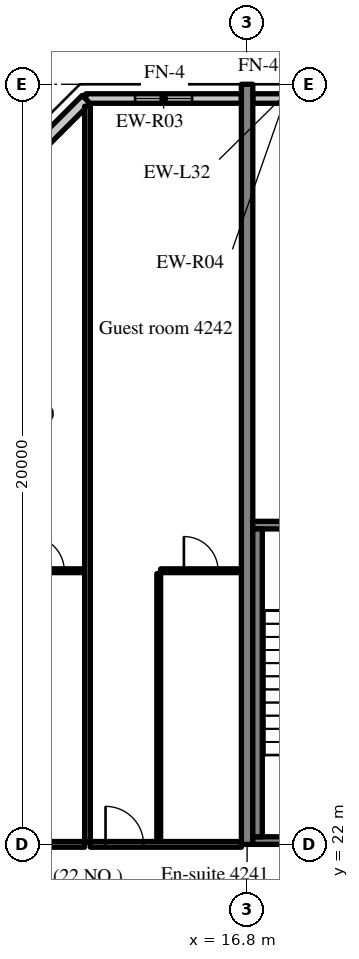
"""IFC4 building model, lengths in metres.
Left out: names, types, materials, properties, quantities, classifications, styles, units other than length and angle.
Written with IfcOpenShell. Run it as: python <this file> out.ifc"""

import sys

from ifc_helpers import new_model, si_unit, direction, frame, frame_2d, origin, place, context, subcontext, project, spatial, rectangle, extrude, source, transform, mapped, element, fill, save


model = new_model("IFC4")
c1 = context("Model", 3, precision=1e-05, world=origin(), true_north=direction((0.0, 1.0)))
c2 = subcontext(c1, "Body", "Model", "MODEL_VIEW")
j1 = project(units=[si_unit("LENGTHUNIT", "METRE"), si_unit("PLANEANGLEUNIT", "RADIAN")], contexts=[c1])
p1 = place(None, origin())
s1 = spatial("IfcSite", under=j1, at=p1, CompositionType="ELEMENT")
p2 = place(p1, origin())
s2 = spatial("IfcBuilding", under=s1, at=p2, CompositionType="ELEMENT")
p3 = place(p2, frame((0.0, 0.0, 174.4)))
s3 = spatial("IfcBuildingStorey", under=s2, at=p3, CompositionType="ELEMENT", Elevation=174.4)
m1 = source(origin(), c2, "Body", "SweptSolid", [
    extrude(rectangle(XDim=20.0, YDim=0.3, at=frame_2d((10.0, 0.0))), origin(), (0.0, 0.0, 1.0), 3.52),
])
p4 = place(p3, frame((16.8, 22.0, 0.0), z_axis=(0.0, 0.0, 1.0), x_axis=(0.0, 1.0, 0.0)))
e1 = element("IfcWall", 1, at=p4, inside=s3, PredefinedType="SHEAR", context=c2, shape_type="MappedRepresentation", body=[
    mapped(m1, transform((0.0, 0.0, 0.0), scale=1.0)),
])
m2 = source(origin(), c2, "Body", "SweptSolid", [
    extrude(rectangle(XDim=4.094, YDim=0.25, at=frame_2d((2.047, 0.0))), origin(), (0.0, 0.0, 1.0), 2.87),
])
p5 = place(p3, frame((16.65, 41.625, 0.0), z_axis=(0.0, 0.0, 1.0), x_axis=(-1.0, 0.0, 0.0)))
e2 = element("IfcWall", 2, at=p5, inside=s3, PredefinedType="SOLIDWALL", context=c2, shape_type="MappedRepresentation", body=[
    mapped(m2, transform((0.0, 0.0, 0.0), scale=1.0)),
])
m3 = source(origin(), c2, "Body", "SweptSolid", [
    extrude(rectangle(XDim=1.5, YDim=1.5, at=frame_2d((0.75, 0.75))), frame((0.0, 0.135, 0.0), z_axis=(0.0, -1.0, 0.0), x_axis=(1.0, 0.0, 0.0)), (0.0, 0.0, 1.0), 0.27),
])
p6 = place(p5, frame((1.297, 0.0, 0.9)))
e3 = element("IfcOpeningElement", 3, at=p6, cuts=e2, PredefinedType="OPENING", context=c2, shape_type="MappedRepresentation", body=[
    mapped(m3, transform((0.0, 0.0, 0.0), scale=1.0)),
])
m4 = source(origin(), c2, "Body", "SweptSolid", [
    extrude(rectangle(XDim=1.708, YDim=0.25, at=frame_2d((0.854, 0.0))), origin(), (0.0, 0.0, 1.0), 2.87),
])
p7 = place(p3, frame((18.658, 41.625, 0.0), z_axis=(0.0, 0.0, 1.0), x_axis=(-1.0, 0.0, 0.0)))
e4 = element("IfcWall", 4, at=p7, inside=s3, PredefinedType="SOLIDWALL", context=c2, shape_type="MappedRepresentation", body=[
    mapped(m4, transform((0.0, 0.0, 0.0), scale=1.0)),
])
m5 = source(origin(), c2, "Body", "SweptSolid", [
    extrude(rectangle(XDim=5.326, YDim=0.3, at=frame_2d((2.663, 0.0))), origin(), (0.0, 0.0, 1.0), 3.52),
])
p8 = place(p3, frame((12.566, 41.6, 0.0), z_axis=(0.0, 0.0, 1.0), x_axis=(-0.707083859269, -0.707129702361, 0.0)))
e5 = element("IfcWall", 5, at=p8, inside=s3, PredefinedType="SOLIDWALL", context=c2, shape_type="MappedRepresentation", body=[
    mapped(m5, transform((0.0, 0.0, 0.0), scale=1.0)),
])
m6 = source(origin(), c2, "Body", "SweptSolid", [
    extrude(rectangle(XDim=1.8, YDim=1.5, at=frame_2d((0.9, 0.75))), frame((0.0, 0.16, 0.0), z_axis=(0.0, -1.0, 0.0), x_axis=(1.0, 0.0, 0.0)), (0.0, 0.0, 1.0), 0.32),
])
p9 = place(p8, frame((1.689, 0.0, 0.9)))
e6 = element("IfcOpeningElement", 6, at=p9, cuts=e5, PredefinedType="OPENING", context=c2, shape_type="MappedRepresentation", body=[
    mapped(m6, transform((0.0, 0.0, 0.0), scale=1.0)),
])
m7 = source(origin(), c2, "Body", "SweptSolid", [
    extrude(rectangle(XDim=8.25, YDim=0.2, at=frame_2d((4.125, 0.0))), origin(), (0.0, 0.0, 1.0), 3.52),
])
p10 = place(p3, frame((16.95, 22.1, 0.0), z_axis=(0.0, 0.0, 1.0), x_axis=(1.0, 0.0, 0.0)))
e7 = element("IfcWall", 7, at=p10, inside=s3, PredefinedType="SOLIDWALL", context=c2, shape_type="MappedRepresentation", body=[
    mapped(m7, transform((0.0, 0.0, 0.0), scale=1.0)),
])
m8 = source(origin(), c2, "Body", "SweptSolid", [
    extrude(rectangle(XDim=1.2, YDim=2.1, at=frame_2d((0.6, 1.05))), frame((0.0, 0.11, 0.0), z_axis=(0.0, -1.0, 0.0), x_axis=(1.0, 0.0, 0.0)), (0.0, 0.0, 1.0), 0.22),
])
p11 = place(p10, frame((6.05, 0.0, 0.0)))
e8 = element("IfcOpeningElement", 8, at=p11, cuts=e7, PredefinedType="OPENING", context=c2, shape_type="MappedRepresentation", body=[
    mapped(m8, transform((0.0, 0.0, 0.0), scale=1.0)),
])
p12 = place(p3, frame((16.95, 30.4, 0.0), z_axis=(0.0, 0.0, 1.0), x_axis=(1.0, 0.0, 0.0)))
e9 = element("IfcWall", 9, at=p12, inside=s3, PredefinedType="SOLIDWALL", context=c2, shape_type="MappedRepresentation", body=[
    mapped(m7, transform((0.0, 0.0, 0.0), scale=1.0)),
])
m9 = source(origin(), c2, "Body", "SweptSolid", [
    extrude(rectangle(XDim=1.0, YDim=2.1, at=frame_2d((0.5, 1.05))), frame((0.0, 0.11, 0.0), z_axis=(0.0, -1.0, 0.0), x_axis=(1.0, 0.0, 0.0)), (0.0, 0.0, 1.0), 0.22),
])
p13 = place(p12, frame((6.15, 0.0, 0.0)))
e10 = element("IfcOpeningElement", 10, at=p13, cuts=e9, PredefinedType="OPENING", context=c2, shape_type="MappedRepresentation", body=[
    mapped(m9, transform((0.0, 0.0, 0.0), scale=1.0)),
])
m10 = source(origin(), c2, "Body", "SweptSolid", [
    extrude(rectangle(XDim=8.1, YDim=0.25, at=frame_2d((4.05, 0.0))), origin(), (0.0, 0.0, 1.0), 3.52),
])
p14 = place(p3, frame((17.075, 22.2, 0.0), z_axis=(0.0, 0.0, 1.0), x_axis=(0.0, 1.0, 0.0)))
e11 = element("IfcWall", 11, at=p14, inside=s3, PredefinedType="SOLIDWALL", context=c2, shape_type="MappedRepresentation", body=[
    mapped(m10, transform((0.0, 0.0, 0.0), scale=1.0)),
])
m11 = source(origin(), c2, "Body", "SweptSolid", [
    extrude(rectangle(XDim=1.975, YDim=0.1, at=frame_2d((0.987, 0.0))), origin(), (0.0, 0.0, 1.0), 3.52),
])
p15 = place(p3, frame((10.55, 29.2, 0.0), z_axis=(0.0, 0.0, 1.0), x_axis=(1.0, 0.0, 0.0)))
e12 = element("IfcWall", 12, at=p15, inside=s3, PredefinedType="PARTITIONING", context=c2, shape_type="MappedRepresentation", body=[
    mapped(m11, transform((0.0, 0.0, 0.0), scale=1.0)),
])
m12 = source(origin(), c2, "Body", "SweptSolid", [
    extrude(rectangle(XDim=0.9, YDim=2.1, at=frame_2d((0.45, 1.05))), frame((0.0, 0.06, 0.0), z_axis=(0.0, -1.0, 0.0), x_axis=(1.0, 0.0, 0.0)), (0.0, 0.0, 1.0), 0.12),
])
p16 = place(p15, frame((0.538, 0.0, 0.0)))
e13 = element("IfcOpeningElement", 13, at=p16, cuts=e12, PredefinedType="OPENING", context=c2, shape_type="MappedRepresentation", body=[
    mapped(m12, transform((0.0, 0.0, 0.0), scale=1.0)),
])
m13 = source(origin(), c2, "Body", "SweptSolid", [
    extrude(rectangle(XDim=3.825, YDim=0.15, at=frame_2d((1.913, 0.0))), origin(), (0.0, 0.0, 1.0), 2.82),
])
p17 = place(p3, frame((8.7, 22.0, 0.0), z_axis=(0.0, 0.0, 1.0), x_axis=(1.0, 0.0, 0.0)))
e14 = element("IfcWall", 14, at=p17, inside=s3, PredefinedType="PARTITIONING", context=c2, shape_type="MappedRepresentation", body=[
    mapped(m13, transform((0.0, 0.0, 0.0), scale=1.0)),
])
m14 = source(origin(), c2, "Body", "SweptSolid", [
    extrude(rectangle(XDim=1.0, YDim=2.1, at=frame_2d((0.5, 1.05))), frame((0.0, 0.085, 0.0), z_axis=(0.0, -1.0, 0.0), x_axis=(1.0, 0.0, 0.0)), (0.0, 0.0, 1.0), 0.17),
])
p18 = place(p17, frame((0.4, 0.0, 0.0)))
e15 = element("IfcOpeningElement", 15, at=p18, cuts=e14, PredefinedType="OPENING", context=c2, shape_type="MappedRepresentation", body=[
    mapped(m14, transform((0.0, 0.0, 0.0), scale=1.0)),
])
m15 = source(origin(), c2, "Body", "SweptSolid", [
    extrude(rectangle(XDim=7.05, YDim=0.1, at=frame_2d((3.525, 0.0))), origin(), (0.0, 0.0, 1.0), 3.52),
])
p19 = place(p3, frame((14.475, 22.075, 0.0), z_axis=(0.0, 0.0, 1.0), x_axis=(0.0, 1.0, 0.0)))
e16 = element("IfcWall", 16, at=p19, inside=s3, PredefinedType="PARTITIONING", context=c2, shape_type="MappedRepresentation", body=[
    mapped(m15, transform((0.0, 0.0, 0.0), scale=1.0)),
])
m16 = source(origin(), c2, "Body", "SweptSolid", [
    extrude(rectangle(XDim=2.125, YDim=0.1, at=frame_2d((1.062, 0.0))), origin(), (0.0, 0.0, 1.0), 3.52),
])
p20 = place(p3, frame((14.525, 29.2, 0.0), z_axis=(0.0, 0.0, 1.0), x_axis=(1.0, 0.0, 0.0)))
e17 = element("IfcWall", 17, at=p20, inside=s3, PredefinedType="PARTITIONING", context=c2, shape_type="MappedRepresentation", body=[
    mapped(m16, transform((0.0, 0.0, 0.0), scale=1.0)),
])
p21 = place(p20, frame((0.612, 0.0, 0.0)))
e18 = element("IfcOpeningElement", 18, at=p21, cuts=e17, PredefinedType="OPENING", context=c2, shape_type="MappedRepresentation", body=[
    mapped(m12, transform((0.0, 0.0, 0.0), scale=1.0)),
])
m17 = source(origin(), c2, "Body", "SweptSolid", [
    extrude(rectangle(XDim=3.975, YDim=0.15, at=frame_2d((1.987, 0.0))), origin(), (0.0, 0.0, 1.0), 2.82),
])
p22 = place(p3, frame((12.675, 22.0, 0.0), z_axis=(0.0, 0.0, 1.0), x_axis=(1.0, 0.0, 0.0)))
e19 = element("IfcWall", 19, at=p22, inside=s3, PredefinedType="PARTITIONING", context=c2, shape_type="MappedRepresentation", body=[
    mapped(m17, transform((0.0, 0.0, 0.0), scale=1.0)),
])
p23 = place(p22, frame((0.4, 0.0, 0.0)))
e20 = element("IfcOpeningElement", 20, at=p23, cuts=e19, PredefinedType="OPENING", context=c2, shape_type="MappedRepresentation", body=[
    mapped(m14, transform((0.0, 0.0, 0.0), scale=1.0)),
])
m18 = source(origin(), c2, "Body", "SweptSolid", [
    extrude(rectangle(XDim=19.347, YDim=0.15, at=frame_2d((9.674, 0.0))), origin(), (0.0, 0.0, 1.0), 3.52),
])
p24 = place(p3, frame((12.6, 22.075, 0.0), z_axis=(0.0, 0.0, 1.0), x_axis=(0.0, 1.0, 0.0)))
e21 = element("IfcWall", 21, at=p24, inside=s3, PredefinedType="PARTITIONING", context=c2, shape_type="MappedRepresentation", body=[
    mapped(m18, transform((0.0, 0.0, 0.0), scale=1.0)),
])
m19 = source(origin(), c2, "Body", "SweptSolid", [
    extrude(rectangle(XDim=1.5, YDim=1.5, at=frame_2d((0.75, 0.75))), frame((0.0, 0.03, 0.0), z_axis=(0.0, -1.0, 0.0), x_axis=(1.0, 0.0, 0.0)), (0.0, 0.0, 1.0), 0.06),
])
p25 = place(p6, origin())
e22 = element("IfcWindow", 22, at=p25, inside=s3, PartitioningType="SINGLE_PANEL", PredefinedType="WINDOW", context=c2, shape_type="MappedRepresentation", body=[
    mapped(m19, transform((0.0, 0.0, 0.0), scale=1.0)),
])
fill(e3, e22)
m20 = source(origin(), c2, "Body", "SweptSolid", [
    extrude(rectangle(XDim=0.9, YDim=2.1, at=frame_2d((0.45, 1.05))), frame((0.0, 0.025, 0.0), z_axis=(0.0, -1.0, 0.0), x_axis=(1.0, 0.0, 0.0)), (0.0, 0.0, 1.0), 0.05),
])
p26 = place(p16, origin())
e23 = element("IfcDoor", 23, at=p26, inside=s3, OperationType="SINGLE_SWING_LEFT", PredefinedType="DOOR", context=c2, shape_type="MappedRepresentation", body=[
    mapped(m20, transform((0.0, 0.0, 0.0), scale=1.0)),
])
fill(e13, e23)
p27 = place(p21, origin())
e24 = element("IfcDoor", 24, at=p27, inside=s3, OperationType="SINGLE_SWING_LEFT", PredefinedType="DOOR", context=c2, shape_type="MappedRepresentation", body=[
    mapped(m20, transform((0.0, 0.0, 0.0), scale=1.0)),
])
fill(e18, e24)
m21 = source(origin(), c2, "Body", "SweptSolid", [
    extrude(rectangle(XDim=1.0, YDim=2.1, at=frame_2d((0.5, 1.05))), frame((0.0, 0.025, 0.0), z_axis=(0.0, -1.0, 0.0), x_axis=(1.0, 0.0, 0.0)), (0.0, 0.0, 1.0), 0.05),
])
p28 = place(p23, origin())
e25 = element("IfcDoor", 25, at=p28, inside=s3, OperationType="SINGLE_SWING_LEFT", PredefinedType="DOOR", context=c2, shape_type="MappedRepresentation", body=[
    mapped(m21, transform((0.0, 0.0, 0.0), scale=1.0)),
])
fill(e20, e25)
save(model, sys.argv[1])
